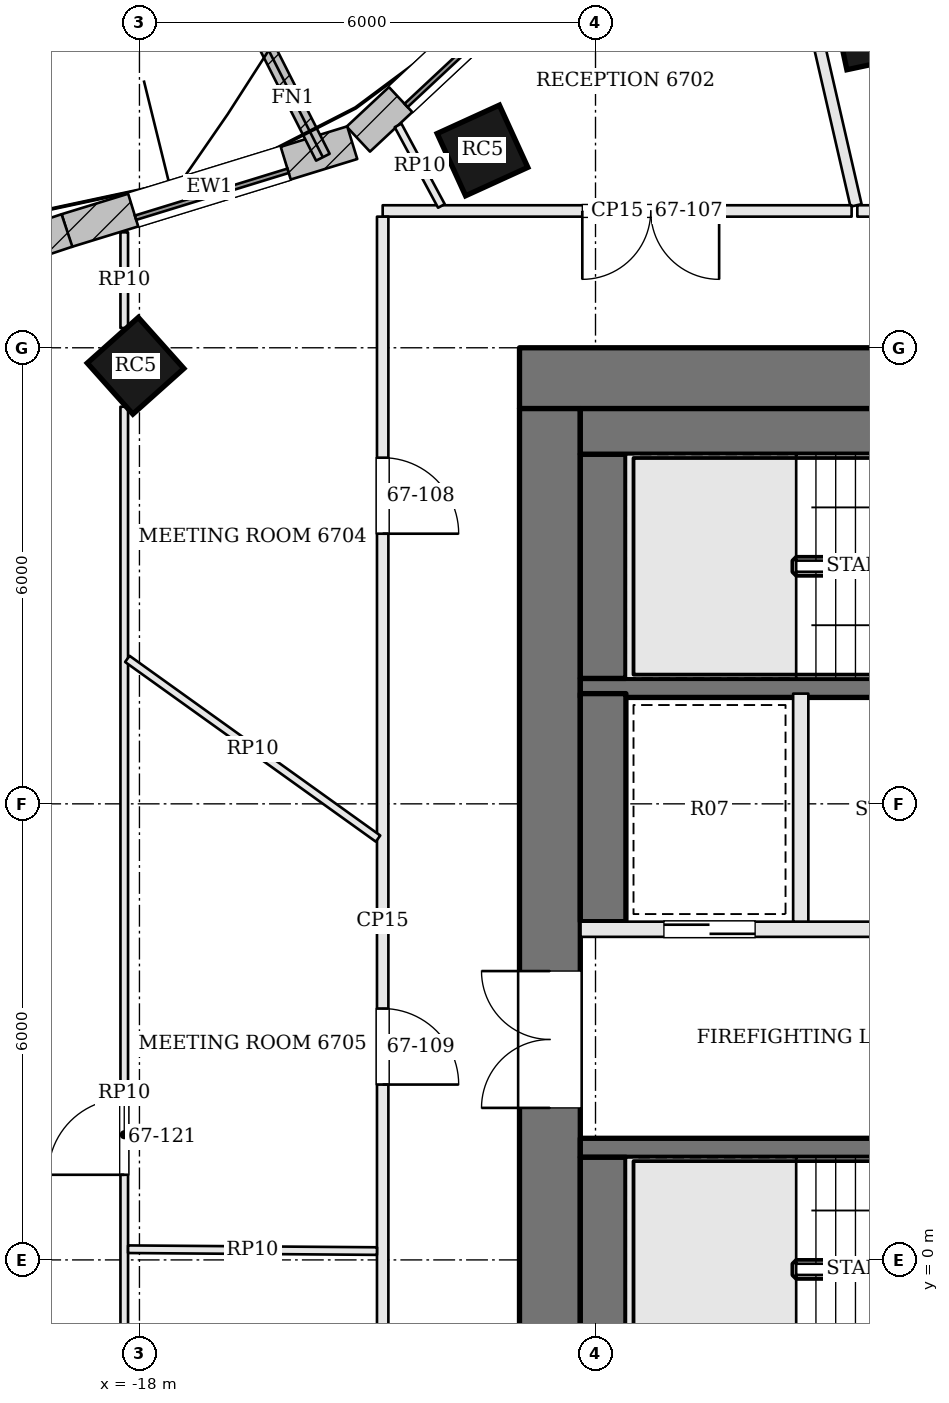
"""IFC4 building model, lengths in metres.
Left out: names, types, materials, properties, quantities, classifications, styles, units other than length and angle.
Written with IfcOpenShell. Run it as: python <this file> out.ifc"""

import sys

from ifc_helpers import new_model, si_unit, direction, frame, frame_2d, origin, origin_2d, place, context, subcontext, project, spatial, rectangle, extrude, element, fill, save


model = new_model("IFC4")
c1 = context("Model", 3, precision=1e-05, world=origin(), true_north=direction((0.0, 1.0)))
c2 = subcontext(c1, "Body", "Model", "MODEL_VIEW")
j1 = project(units=[si_unit("LENGTHUNIT", "METRE"), si_unit("PLANEANGLEUNIT", "RADIAN")], contexts=[c1])
p1 = place(None, origin())
s1 = spatial("IfcSite", under=j1, at=p1, CompositionType="ELEMENT")
p2 = place(p1, origin())
s2 = spatial("IfcBuilding", under=s1, at=p2, CompositionType="ELEMENT")
p3 = place(p2, frame((0.0, 0.0, 272.7)))
s3 = spatial("IfcBuildingStorey", under=s2, at=p3, CompositionType="ELEMENT", Elevation=272.7)
p4 = place(p3, frame((-13.0, 11.6, 0.0), z_axis=(0.0, 0.0, 1.0), x_axis=(1.0, 0.0, 0.0)))
e1 = element("IfcWall", 1, at=p4, inside=s3, PredefinedType="SHEAR", context=c2, shape_type="SweptSolid", body=[
    extrude(rectangle(XDim=26.0, YDim=0.8, at=frame_2d((13.0, 0.0))), origin(), (0.0, 0.0, 1.0), 3.9),
])
p5 = place(p4, frame((8.975, 0.0, 0.0)))
e2 = element("IfcOpeningElement", 2, at=p5, cuts=e1, PredefinedType="OPENING", context=c2, shape_type="SweptSolid", body=[
    extrude(rectangle(XDim=0.7, YDim=2.1, at=frame_2d((0.35, 1.05))), frame((0.0, 0.41, 0.0), z_axis=(0.0, -1.0, 0.0), x_axis=(1.0, 0.0, 0.0)), (0.0, 0.0, 1.0), 0.82),
])
p6 = place(p4, frame((11.025, 0.0, 0.0)))
e3 = element("IfcOpeningElement", 3, at=p6, cuts=e1, PredefinedType="OPENING", context=c2, shape_type="SweptSolid", body=[
    extrude(rectangle(XDim=0.7, YDim=2.1, at=frame_2d((0.35, 1.05))), frame((0.0, 0.41, 0.0), z_axis=(0.0, -1.0, 0.0), x_axis=(1.0, 0.0, 0.0)), (0.0, 0.0, 1.0), 0.82),
])
p7 = place(p4, frame((12.925, 0.0, 0.0)))
e4 = element("IfcOpeningElement", 4, at=p7, cuts=e1, PredefinedType="OPENING", context=c2, shape_type="SweptSolid", body=[
    extrude(rectangle(XDim=1.0, YDim=2.1, at=frame_2d((0.5, 1.05))), frame((0.0, 0.41, 0.0), z_axis=(0.0, -1.0, 0.0), x_axis=(1.0, 0.0, 0.0)), (0.0, 0.0, 1.0), 0.82),
])
p8 = place(p4, frame((15.775, 0.0, 0.0)))
e5 = element("IfcOpeningElement", 5, at=p8, cuts=e1, PredefinedType="OPENING", context=c2, shape_type="SweptSolid", body=[
    extrude(rectangle(XDim=1.0, YDim=2.1, at=frame_2d((0.5, 1.05))), frame((0.0, 0.41, 0.0), z_axis=(0.0, -1.0, 0.0), x_axis=(1.0, 0.0, 0.0)), (0.0, 0.0, 1.0), 0.82),
])
p9 = place(p3, frame((-12.6, -2.2, 0.0), z_axis=(0.0, 0.0, 1.0), x_axis=(0.0, 1.0, 0.0)))
e6 = element("IfcWall", 6, at=p9, inside=s3, PredefinedType="SHEAR", context=c2, shape_type="SweptSolid", body=[
    extrude(rectangle(XDim=13.4, YDim=0.8, at=frame_2d((6.7, 0.0))), origin(), (0.0, 0.0, 1.0), 3.9),
])
p10 = place(p9, frame((4.2, 0.0, 0.0)))
e7 = element("IfcOpeningElement", 7, at=p10, cuts=e6, PredefinedType="OPENING", context=c2, shape_type="SweptSolid", body=[
    extrude(rectangle(XDim=1.8, YDim=2.1, at=frame_2d((0.9, 1.05))), frame((0.0, 0.41, 0.0), z_axis=(0.0, -1.0, 0.0), x_axis=(1.0, 0.0, 0.0)), (0.0, 0.0, 1.0), 0.82),
])
for number, where, z_axis, x_axis in (
    (8, (-8.347, 16.192, 0.0), (0.0, 0.0, 1.0), (-0.978, -0.209, 0.0)),
    (9, (-13.487, 14.596, 0.0), (0.0, 0.0, 1.0), (-0.91, -0.415, 0.0)),
    (10, (-18.051, 11.763, 0.0), (0.0, 0.0, 1.0), (-0.746, -0.666, 0.0)),
):
    element("IfcColumn", number, at=place(p3, frame(where, z_axis=z_axis, x_axis=x_axis)), inside=s3, PredefinedType="COLUMN", context=c2, shape_type="SweptSolid", body=[
        extrude(rectangle(XDim=0.9, YDim=0.9, at=origin_2d()), origin(), (0.0, 0.0, 1.0), 3.9),
    ])
p11 = place(p3, frame((-12.473, 17.219, 0.0), z_axis=(0.0, 0.0, 1.0), x_axis=(-0.730618259172, -0.68278617397, 0.0)))
e11 = element("IfcWall", 11, at=p11, inside=s3, PredefinedType="SOLIDWALL", context=c2, shape_type="SweptSolid", body=[
    extrude(rectangle(XDim=3.624, YDim=0.45, at=frame_2d((1.812, 0.0))), origin(), (0.0, 0.0, 1.0), 3.7),
])
p12 = place(p11, frame((0.762, 0.0, 0.9)))
e12 = element("IfcOpeningElement", 12, at=p12, cuts=e11, PredefinedType="OPENING", context=c2, shape_type="SweptSolid", body=[
    extrude(rectangle(XDim=2.1, YDim=2.3, at=frame_2d((1.05, 1.15))), frame((0.0, 0.235, 0.0), z_axis=(0.0, -1.0, 0.0), x_axis=(1.0, 0.0, 0.0)), (0.0, 0.0, 1.0), 0.47),
])
p13 = place(p3, frame((-15.2, 14.698, 0.0), z_axis=(0.0, 0.0, 1.0), x_axis=(-0.955797807378, -0.294024746256, 0.0)))
e13 = element("IfcWall", 13, at=p13, inside=s3, PredefinedType="SOLIDWALL", context=c2, shape_type="SweptSolid", body=[
    extrude(rectangle(XDim=3.931, YDim=0.45, at=frame_2d((1.965, 0.0))), origin(), (0.0, 0.0, 1.0), 3.7),
])
p14 = place(p13, frame((0.915, 0.0, 0.9)))
e14 = element("IfcOpeningElement", 14, at=p14, cuts=e13, PredefinedType="OPENING", context=c2, shape_type="SweptSolid", body=[
    extrude(rectangle(XDim=2.1, YDim=2.3, at=frame_2d((1.05, 1.15))), frame((0.0, 0.235, 0.0), z_axis=(0.0, -1.0, 0.0), x_axis=(1.0, 0.0, 0.0)), (0.0, 0.0, 1.0), 0.47),
])
p15 = place(p3, frame((-18.954, 13.543, 0.0), z_axis=(0.0, 0.0, 1.0), x_axis=(-0.948673679101, -0.316256621402, 0.0)))
e15 = element("IfcWall", 15, at=p15, inside=s3, PredefinedType="SOLIDWALL", context=c2, shape_type="SweptSolid", body=[
    extrude(rectangle(XDim=5.076, YDim=0.45, at=frame_2d((2.538, 0.0))), origin(), (0.0, 0.0, 1.0), 3.7),
])
p16 = place(p15, frame((1.488, 0.0, 0.9)))
e16 = element("IfcOpeningElement", 16, at=p16, cuts=e15, PredefinedType="OPENING", context=c2, shape_type="SweptSolid", body=[
    extrude(rectangle(XDim=2.1, YDim=2.3, at=frame_2d((1.05, 1.15))), frame((0.0, 0.235, 0.0), z_axis=(0.0, -1.0, 0.0), x_axis=(1.0, 0.0, 0.0)), (0.0, 0.0, 1.0), 0.47),
])
p17 = place(p3, frame((-15.587, 14.507, 0.0), z_axis=(0.0, 0.0, 1.0), x_axis=(-0.452117231361, 0.89195852432, 0.0)))
e17 = element("IfcWall", 17, at=p17, inside=s3, PredefinedType="SOLIDWALL", context=c2, shape_type="SweptSolid", body=[
    extrude(rectangle(XDim=1.75, YDim=0.2, at=frame_2d((0.875, 0.0))), origin(), (0.0, 0.0, 1.0), 3.7),
])
p18 = place(p3, frame((-12.2, 1.475, 0.0), z_axis=(0.0, 0.0, 1.0), x_axis=(1.0, 0.0, 0.0)))
e18 = element("IfcWall", 18, at=p18, inside=s3, PredefinedType="SOLIDWALL", context=c2, shape_type="SweptSolid", body=[
    extrude(rectangle(XDim=7.1, YDim=0.25, at=frame_2d((3.55, 0.0))), origin(), (0.0, 0.0, 1.0), 3.7),
])
p19 = place(p18, frame((5.8, 0.0, 0.0)))
e19 = element("IfcOpeningElement", 19, at=p19, cuts=e18, PredefinedType="OPENING", context=c2, shape_type="SweptSolid", body=[
    extrude(rectangle(XDim=1.2, YDim=2.1, at=frame_2d((0.6, 1.05))), frame((0.0, 0.135, 0.0), z_axis=(0.0, -1.0, 0.0), x_axis=(1.0, 0.0, 0.0)), (0.0, 0.0, 1.0), 0.27),
])
p20 = place(p3, frame((-12.2, 4.35, 0.0), z_axis=(0.0, 0.0, 1.0), x_axis=(1.0, 0.0, 0.0)))
e20 = element("IfcWall", 20, at=p20, inside=s3, PredefinedType="SOLIDWALL", context=c2, shape_type="SweptSolid", body=[
    extrude(rectangle(XDim=7.1, YDim=0.2, at=frame_2d((3.55, 0.0))), origin(), (0.0, 0.0, 1.0), 3.7),
])
p21 = place(p20, frame((4.4, 0.0, 0.0)))
e21 = element("IfcOpeningElement", 21, at=p21, cuts=e20, PredefinedType="OPENING", context=c2, shape_type="SweptSolid", body=[
    extrude(rectangle(XDim=1.2, YDim=2.1, at=frame_2d((0.6, 1.05))), frame((0.0, 0.11, 0.0), z_axis=(0.0, -1.0, 0.0), x_axis=(1.0, 0.0, 0.0)), (0.0, 0.0, 1.0), 0.22),
])
p22 = place(p20, frame((1.1, 0.0, 0.0)))
e22 = element("IfcOpeningElement", 22, at=p22, cuts=e20, PredefinedType="OPENING", context=c2, shape_type="SweptSolid", body=[
    extrude(rectangle(XDim=1.2, YDim=2.1, at=frame_2d((0.6, 1.05))), frame((0.0, 0.11, 0.0), z_axis=(0.0, -1.0, 0.0), x_axis=(1.0, 0.0, 0.0)), (0.0, 0.0, 1.0), 0.22),
])
p23 = place(p3, frame((-12.2, 7.525, 0.0), z_axis=(0.0, 0.0, 1.0), x_axis=(1.0, 0.0, 0.0)))
e23 = element("IfcWall", 23, at=p23, inside=s3, PredefinedType="SOLIDWALL", context=c2, shape_type="SweptSolid", body=[
    extrude(rectangle(XDim=7.1, YDim=0.25, at=frame_2d((3.55, 0.0))), origin(), (0.0, 0.0, 1.0), 3.7),
])
p24 = place(p23, frame((5.8, 0.0, 0.0)))
e24 = element("IfcOpeningElement", 24, at=p24, cuts=e23, PredefinedType="OPENING", context=c2, shape_type="SweptSolid", body=[
    extrude(rectangle(XDim=1.2, YDim=2.1, at=frame_2d((0.6, 1.05))), frame((0.0, 0.135, 0.0), z_axis=(0.0, -1.0, 0.0), x_axis=(1.0, 0.0, 0.0)), (0.0, 0.0, 1.0), 0.27),
])
p25 = place(p3, frame((-9.3, 4.45, 0.0), z_axis=(0.0, 0.0, 1.0), x_axis=(0.0, 1.0, 0.0)))
e25 = element("IfcWall", 25, at=p25, inside=s3, PredefinedType="SOLIDWALL", context=c2, shape_type="SweptSolid", body=[
    extrude(rectangle(XDim=3.0, YDim=0.2, at=frame_2d((1.5, 0.0))), origin(), (0.0, 0.0, 1.0), 3.7),
])
p26 = place(p3, frame((-11.9, -1.6, 0.0), z_axis=(0.0, 0.0, 1.0), x_axis=(0.0, 1.0, 0.0)))
e26 = element("IfcWall", 26, at=p26, inside=s3, PredefinedType="SOLIDWALL", context=c2, shape_type="SweptSolid", body=[
    extrude(rectangle(XDim=2.95, YDim=0.6, at=frame_2d((1.475, 0.0))), origin(), (0.0, 0.0, 1.0), 3.7),
])
p27 = place(p3, frame((-11.9, 4.45, 0.0), z_axis=(0.0, 0.0, 1.0), x_axis=(0.0, 1.0, 0.0)))
e27 = element("IfcWall", 27, at=p27, inside=s3, PredefinedType="SOLIDWALL", context=c2, shape_type="SweptSolid", body=[
    extrude(rectangle(XDim=3.0, YDim=0.6, at=frame_2d((1.5, 0.0))), origin(), (0.0, 0.0, 1.0), 3.7),
])
p28 = place(p3, frame((-11.9, 7.65, 0.0), z_axis=(0.0, 0.0, 1.0), x_axis=(0.0, 1.0, 0.0)))
e28 = element("IfcWall", 28, at=p28, inside=s3, PredefinedType="SOLIDWALL", context=c2, shape_type="SweptSolid", body=[
    extrude(rectangle(XDim=2.95, YDim=0.6, at=frame_2d((1.475, 0.0))), origin(), (0.0, 0.0, 1.0), 3.7),
])
p29 = place(p3, frame((-12.2, 10.9, 0.0), z_axis=(0.0, 0.0, 1.0), x_axis=(1.0, 0.0, 0.0)))
e29 = element("IfcWall", 29, at=p29, inside=s3, PredefinedType="SOLIDWALL", context=c2, shape_type="SweptSolid", body=[
    extrude(rectangle(XDim=7.1, YDim=0.6, at=frame_2d((3.55, 0.0))), origin(), (0.0, 0.0, 1.0), 3.7),
])
p30 = place(p3, frame((14.725, 13.8, 0.0), z_axis=(0.0, 0.0, 1.0), x_axis=(-1.0, 0.0, 0.0)))
e30 = element("IfcWall", 30, at=p30, inside=s3, PredefinedType="PARTITIONING", context=c2, shape_type="SweptSolid", body=[
    extrude(rectangle(XDim=23.281, YDim=0.15, at=frame_2d((11.64, 0.0))), origin(), (0.0, 0.0, 1.0), 3.198),
])
p31 = place(p30, frame((3.15, 0.0, 0.0)))
e31 = element("IfcOpeningElement", 31, at=p31, cuts=e30, PredefinedType="OPENING", context=c2, shape_type="SweptSolid", body=[
    extrude(rectangle(XDim=1.0, YDim=2.4, at=frame_2d((0.5, 1.2))), frame((0.0, 0.085, 0.0), z_axis=(0.0, -1.0, 0.0), x_axis=(1.0, 0.0, 0.0)), (0.0, 0.0, 1.0), 0.17),
])
p32 = place(p30, frame((5.425, 0.0, 0.0)))
e32 = element("IfcOpeningElement", 32, at=p32, cuts=e30, PredefinedType="OPENING", context=c2, shape_type="SweptSolid", body=[
    extrude(rectangle(XDim=1.0, YDim=2.4, at=frame_2d((0.5, 1.2))), frame((0.0, 0.085, 0.0), z_axis=(0.0, -1.0, 0.0), x_axis=(1.0, 0.0, 0.0)), (0.0, 0.0, 1.0), 0.17),
])
p33 = place(p30, frame((11.558, 0.0, 0.0)))
e33 = element("IfcOpeningElement", 33, at=p33, cuts=e30, PredefinedType="OPENING", context=c2, shape_type="SweptSolid", body=[
    extrude(rectangle(XDim=1.0, YDim=2.4, at=frame_2d((0.5, 1.2))), frame((0.0, 0.085, 0.0), z_axis=(0.0, -1.0, 0.0), x_axis=(1.0, 0.0, 0.0)), (0.0, 0.0, 1.0), 0.17),
])
p34 = place(p30, frame((15.95, 0.0, 0.0)))
e34 = element("IfcOpeningElement", 34, at=p34, cuts=e30, PredefinedType="OPENING", context=c2, shape_type="SweptSolid", body=[
    extrude(rectangle(XDim=0.9, YDim=2.1, at=frame_2d((0.45, 1.05))), frame((0.0, 0.085, 0.0), z_axis=(0.0, -1.0, 0.0), x_axis=(1.0, 0.0, 0.0)), (0.0, 0.0, 1.0), 0.17),
])
p35 = place(p30, frame((19.95, 0.0, 0.0)))
e35 = element("IfcOpeningElement", 35, at=p35, cuts=e30, PredefinedType="OPENING", context=c2, shape_type="SweptSolid", body=[
    extrude(rectangle(XDim=1.0, YDim=2.1, at=frame_2d((0.5, 1.05))), frame((0.0, 0.085, 0.0), z_axis=(0.0, -1.0, 0.0), x_axis=(1.0, 0.0, 0.0)), (0.0, 0.0, 1.0), 0.17),
])
p36 = place(p3, frame((-9.873, 19.531, 0.0), z_axis=(0.0, 0.0, 1.0), x_axis=(0.22405782682, -0.974575851456, 0.0)))
e36 = element("IfcWall", 36, at=p36, inside=s3, PredefinedType="PARTITIONING", context=c2, shape_type="SweptSolid", body=[
    extrude(rectangle(XDim=5.806, YDim=0.15, at=frame_2d((2.903, 0.0))), origin(), (0.0, 0.0, 1.0), 3.198),
])
p37 = place(p3, frame((-8.631, 13.8, 0.0), z_axis=(0.0, 0.0, 1.0), x_axis=(-1.0, 0.0, 0.0)))
e37 = element("IfcWall", 37, at=p37, inside=s3, PredefinedType="PARTITIONING", context=c2, shape_type="SweptSolid", body=[
    extrude(rectangle(XDim=6.169, YDim=0.15, at=frame_2d((3.085, 0.0))), origin(), (0.0, 0.0, 1.0), 3.198),
])
p38 = place(p37, frame((1.743, 0.0, 0.0)))
e38 = element("IfcOpeningElement", 38, at=p38, cuts=e37, PredefinedType="OPENING", context=c2, shape_type="SweptSolid", body=[
    extrude(rectangle(XDim=1.8, YDim=2.1, at=frame_2d((0.9, 1.05))), frame((0.0, 0.085, 0.0), z_axis=(0.0, -1.0, 0.0), x_axis=(1.0, 0.0, 0.0)), (0.0, 0.0, 1.0), 0.17),
])
p39 = place(p3, frame((-14.8, 13.725, 0.0), z_axis=(0.0, 0.0, 1.0), x_axis=(0.0, -1.0, 0.0)))
e39 = element("IfcWall", 39, at=p39, inside=s3, PredefinedType="PARTITIONING", context=c2, shape_type="SweptSolid", body=[
    extrude(rectangle(XDim=18.525, YDim=0.15, at=frame_2d((9.263, 0.0))), origin(), (0.0, 0.0, 1.0), 3.198),
])
p40 = place(p39, frame((3.171, 0.0, 0.0)))
e40 = element("IfcOpeningElement", 40, at=p40, cuts=e39, PredefinedType="OPENING", context=c2, shape_type="SweptSolid", body=[
    extrude(rectangle(XDim=1.0, YDim=2.4, at=frame_2d((0.5, 1.2))), frame((0.0, 0.085, 0.0), z_axis=(0.0, -1.0, 0.0), x_axis=(1.0, 0.0, 0.0)), (0.0, 0.0, 1.0), 0.17),
])
p41 = place(p39, frame((10.418, 0.0, 0.0)))
e41 = element("IfcOpeningElement", 41, at=p41, cuts=e39, PredefinedType="OPENING", context=c2, shape_type="SweptSolid", body=[
    extrude(rectangle(XDim=1.0, YDim=2.4, at=frame_2d((0.5, 1.2))), frame((0.0, 0.085, 0.0), z_axis=(0.0, -1.0, 0.0), x_axis=(1.0, 0.0, 0.0)), (0.0, 0.0, 1.0), 0.17),
])
p42 = place(p39, frame((15.45, 0.0, 0.0)))
e42 = element("IfcOpeningElement", 42, at=p42, cuts=e39, PredefinedType="OPENING", context=c2, shape_type="SweptSolid", body=[
    extrude(rectangle(XDim=1.0, YDim=2.1, at=frame_2d((0.5, 1.05))), frame((0.0, 0.085, 0.0), z_axis=(0.0, -1.0, 0.0), x_axis=(1.0, 0.0, 0.0)), (0.0, 0.0, 1.0), 0.17),
])
p43 = place(p3, frame((-18.2, -7.93, 0.0), z_axis=(0.0, 0.0, 1.0), x_axis=(0.0, 1.0, 0.0)))
e43 = element("IfcWall", 43, at=p43, inside=s3, PredefinedType="PARTITIONING", context=c2, shape_type="SweptSolid", body=[
    extrude(rectangle(XDim=19.154, YDim=0.1, at=frame_2d((9.577, 0.0))), origin(), (0.0, 0.0, 1.0), 3.184),
])
p44 = place(p43, frame((2.79, 0.0, 0.0)))
e44 = element("IfcOpeningElement", 44, at=p44, cuts=e43, PredefinedType="OPENING", context=c2, shape_type="SweptSolid", body=[
    extrude(rectangle(XDim=0.9, YDim=2.1, at=frame_2d((0.45, 1.05))), frame((0.0, 0.06, 0.0), z_axis=(0.0, -1.0, 0.0), x_axis=(1.0, 0.0, 0.0)), (0.0, 0.0, 1.0), 0.12),
])
p45 = place(p43, frame((9.05, 0.0, 0.0)))
e45 = element("IfcOpeningElement", 45, at=p45, cuts=e43, PredefinedType="OPENING", context=c2, shape_type="SweptSolid", body=[
    extrude(rectangle(XDim=1.0, YDim=2.4, at=frame_2d((0.5, 1.2))), frame((0.0, 0.06, 0.0), z_axis=(0.0, -1.0, 0.0), x_axis=(1.0, 0.0, 0.0)), (0.0, 0.0, 1.0), 0.12),
])
p46 = place(p3, frame((-18.2, 12.26, 0.0), z_axis=(0.0, 0.0, 1.0), x_axis=(0.0, 1.0, 0.0)))
e46 = element("IfcWall", 46, at=p46, inside=s3, PredefinedType="PARTITIONING", context=c2, shape_type="SweptSolid", body=[
    extrude(rectangle(XDim=1.259, YDim=0.1, at=frame_2d((0.629, 0.0))), origin(), (0.0, 0.0, 1.0), 3.184),
])
p47 = place(p3, frame((-14.027, 13.866, 0.0), z_axis=(0.0, 0.0, 1.0), x_axis=(-0.473869966251, 0.880594830263, 0.0)))
e47 = element("IfcWall", 47, at=p47, inside=s3, PredefinedType="PARTITIONING", context=c2, shape_type="SweptSolid", body=[
    extrude(rectangle(XDim=1.204, YDim=0.1, at=frame_2d((0.602, 0.0))), origin(), (0.0, 0.0, 1.0), 3.184),
])
p48 = place(p3, frame((-14.861, 5.543, 0.0), z_axis=(0.0, 0.0, 1.0), x_axis=(-0.812793388771, 0.582552063913, 0.0)))
e48 = element("IfcWall", 48, at=p48, inside=s3, PredefinedType="PARTITIONING", context=c2, shape_type="SweptSolid", body=[
    extrude(rectangle(XDim=4.058, YDim=0.1, at=frame_2d((2.029, 0.0))), origin(), (0.0, 0.0, 1.0), 3.184),
])
p49 = place(p3, frame((-14.875, 0.116, 0.0), z_axis=(0.0, 0.0, 1.0), x_axis=(-0.999972213407, 0.007454690722, 0.0)))
e49 = element("IfcWall", 49, at=p49, inside=s3, PredefinedType="PARTITIONING", context=c2, shape_type="SweptSolid", body=[
    extrude(rectangle(XDim=3.275, YDim=0.1, at=frame_2d((1.637, 0.0))), origin(), (0.0, 0.0, 1.0), 3.184),
])
p50 = place(p12, origin())
e50 = element("IfcWindow", 50, at=p50, inside=s3, PartitioningType="SINGLE_PANEL", PredefinedType="WINDOW", context=c2, shape_type="SweptSolid", body=[
    extrude(rectangle(XDim=2.1, YDim=2.3, at=frame_2d((1.05, 1.15))), frame((0.0, 0.135, 0.0), z_axis=(0.0, -1.0, 0.0), x_axis=(1.0, 0.0, 0.0)), (0.0, 0.0, 1.0), 0.06),
])
fill(e12, e50)
p51 = place(p14, origin())
e51 = element("IfcWindow", 51, at=p51, inside=s3, PartitioningType="SINGLE_PANEL", PredefinedType="WINDOW", context=c2, shape_type="SweptSolid", body=[
    extrude(rectangle(XDim=2.1, YDim=2.3, at=frame_2d((1.05, 1.15))), frame((0.0, 0.135, 0.0), z_axis=(0.0, -1.0, 0.0), x_axis=(1.0, 0.0, 0.0)), (0.0, 0.0, 1.0), 0.06),
])
fill(e14, e51)
p52 = place(p10, origin())
e52 = element("IfcDoor", 52, at=p52, inside=s3, OperationType="DOUBLE_DOOR_SINGLE_SWING", PredefinedType="DOOR", context=c2, shape_type="SweptSolid", body=[
    extrude(rectangle(XDim=1.8, YDim=2.1, at=frame_2d((0.9, 1.05))), frame((0.0, 0.025, 0.0), z_axis=(0.0, -1.0, 0.0), x_axis=(1.0, 0.0, 0.0)), (0.0, 0.0, 1.0), 0.05),
])
fill(e7, e52)
p53 = place(p22, origin())
e53 = element("IfcDoor", 53, at=p53, inside=s3, OperationType="SLIDING_TO_RIGHT", PredefinedType="DOOR", context=c2, shape_type="SweptSolid", body=[
    extrude(rectangle(XDim=1.2, YDim=2.1, at=frame_2d((0.6, 1.05))), frame((0.0, 0.025, 0.0), z_axis=(0.0, -1.0, 0.0), x_axis=(1.0, 0.0, 0.0)), (0.0, 0.0, 1.0), 0.05),
])
fill(e22, e53)
p54 = place(p38, origin())
e54 = element("IfcDoor", 54, at=p54, inside=s3, OperationType="DOUBLE_DOOR_SINGLE_SWING", PredefinedType="DOOR", context=c2, shape_type="SweptSolid", body=[
    extrude(rectangle(XDim=1.8, YDim=2.1, at=frame_2d((0.9, 1.05))), frame((0.0, 0.025, 0.0), z_axis=(0.0, -1.0, 0.0), x_axis=(1.0, 0.0, 0.0)), (0.0, 0.0, 1.0), 0.05),
])
fill(e38, e54)
p55 = place(p40, origin())
e55 = element("IfcDoor", 55, at=p55, inside=s3, OperationType="SINGLE_SWING_RIGHT", PredefinedType="DOOR", context=c2, shape_type="SweptSolid", body=[
    extrude(rectangle(XDim=1.0, YDim=2.4, at=frame_2d((0.5, 1.2))), frame((0.0, 0.025, 0.0), z_axis=(0.0, -1.0, 0.0), x_axis=(1.0, 0.0, 0.0)), (0.0, 0.0, 1.0), 0.05),
])
fill(e40, e55)
p56 = place(p41, origin())
e56 = element("IfcDoor", 56, at=p56, inside=s3, OperationType="SINGLE_SWING_RIGHT", PredefinedType="DOOR", context=c2, shape_type="SweptSolid", body=[
    extrude(rectangle(XDim=1.0, YDim=2.4, at=frame_2d((0.5, 1.2))), frame((0.0, 0.025, 0.0), z_axis=(0.0, -1.0, 0.0), x_axis=(1.0, 0.0, 0.0)), (0.0, 0.0, 1.0), 0.05),
])
fill(e41, e56)
p57 = place(p45, origin())
e57 = element("IfcDoor", 57, at=p57, inside=s3, OperationType="SINGLE_SWING_LEFT", PredefinedType="DOOR", context=c2, shape_type="SweptSolid", body=[
    extrude(rectangle(XDim=1.0, YDim=2.4, at=frame_2d((0.5, 1.2))), frame((0.0, 0.025, 0.0), z_axis=(0.0, -1.0, 0.0), x_axis=(1.0, 0.0, 0.0)), (0.0, 0.0, 1.0), 0.05),
])
fill(e45, e57)
save(model, sys.argv[1])
